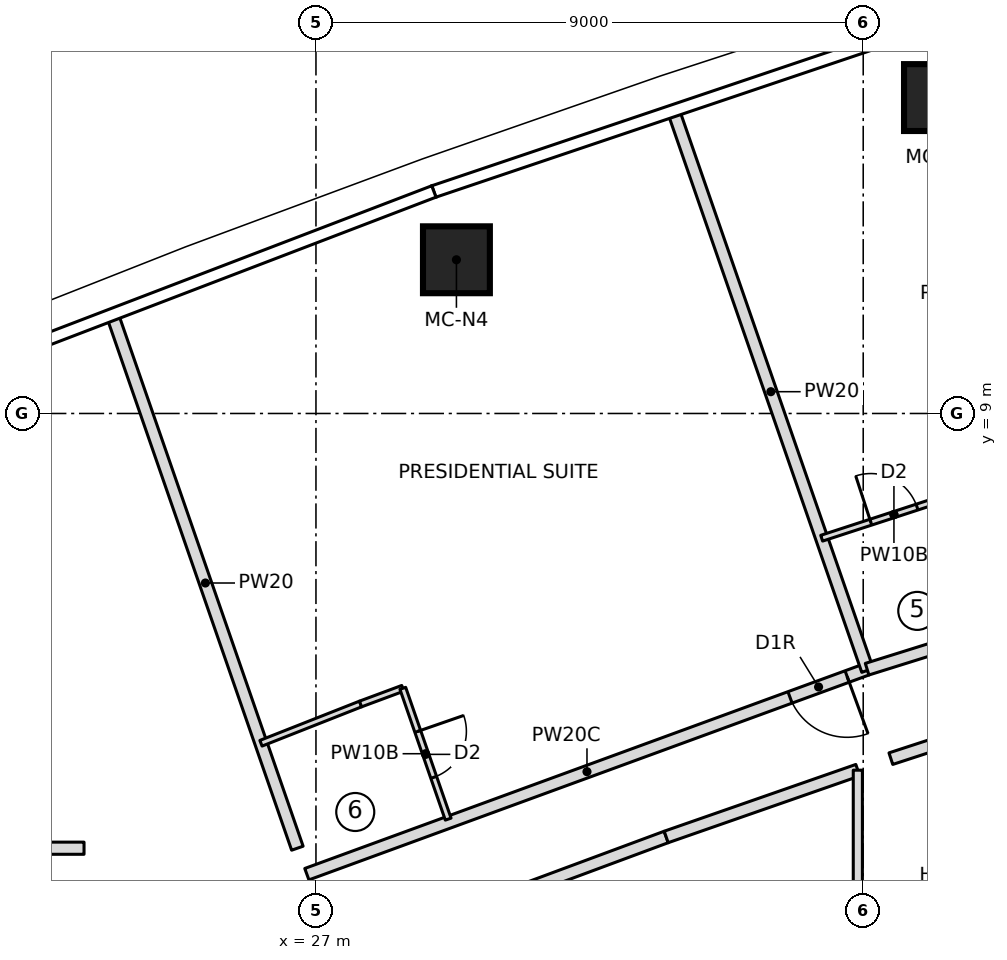
"""IFC4 building model, lengths in metres.
Left out: names, types, materials, properties, quantities, classifications, styles, units other than length and angle.
Written with IfcOpenShell. Run it as: python <this file> out.ifc"""

import sys

from ifc_helpers import new_model, si_unit, direction, frame, frame_2d, origin, origin_2d, place, context, subcontext, project, spatial, rectangle, extrude, element, fill, save


model = new_model("IFC4")
c1 = context("Model", 3, precision=1e-05, world=origin(), true_north=direction((0.0, 1.0)))
c2 = subcontext(c1, "Body", "Model", "MODEL_VIEW")
j1 = project(units=[si_unit("LENGTHUNIT", "METRE"), si_unit("PLANEANGLEUNIT", "RADIAN")], contexts=[c1])
p1 = place(None, origin())
s1 = spatial("IfcSite", under=j1, at=p1, CompositionType="ELEMENT")
p2 = place(p1, origin())
s2 = spatial("IfcBuilding", under=s1, at=p2, CompositionType="ELEMENT")
p3 = place(p2, frame((0.0, 0.0, 292.75)))
s3 = spatial("IfcBuildingStorey", under=s2, at=p3, CompositionType="ELEMENT", Elevation=292.75)
for number, where, z_axis, x_axis in (
    (1, (37.221, 14.196, 0.0), (0.0, 0.0, 1.0), (1.0, 0.0, 0.0)),
    (2, (29.31, 11.528, 0.0), (0.0, 0.0, 1.0), (1.0, 0.0, 0.0)),
):
    element("IfcColumn", number, at=place(p3, frame(where, z_axis=z_axis, x_axis=x_axis)), inside=s3, PredefinedType="COLUMN", context=c2, shape_type="SweptSolid", body=[
        extrude(rectangle(XDim=1.1, YDim=1.1, at=origin_2d()), origin(), (0.0, 0.0, 1.0), 3.55),
    ])
p4 = place(p3, frame((7.287, 1.85, 0.0), z_axis=(0.0, 0.0, 1.0), x_axis=(1.0, 0.0, 0.0)))
e3 = element("IfcWall", 3, at=p4, inside=s3, PredefinedType="PARTITIONING", context=c2, shape_type="SweptSolid", body=[
    extrude(rectangle(XDim=15.899, YDim=0.2, at=frame_2d((7.949, 0.0))), origin(), (0.0, 0.0, 1.0), 3.25),
])
p5 = place(p4, frame((7.624, 0.0, 0.0)))
e4 = element("IfcOpeningElement", 4, at=p5, cuts=e3, PredefinedType="OPENING", context=c2, shape_type="SweptSolid", body=[
    extrude(rectangle(XDim=1.0, YDim=2.1, at=frame_2d((0.5, 1.05))), frame((0.0, 0.11, 0.0), z_axis=(0.0, -1.0, 0.0), x_axis=(1.0, 0.0, 0.0)), (0.0, 0.0, 1.0), 0.22),
])
p6 = place(p3, frame((26.694, 1.85, 0.0), z_axis=(0.0, 0.0, 1.0), x_axis=(-0.327714422317, 0.944776829418, 0.0)))
e5 = element("IfcWall", 5, at=p6, inside=s3, PredefinedType="PARTITIONING", context=c2, shape_type="SweptSolid", body=[
    extrude(rectangle(XDim=9.233, YDim=0.2, at=frame_2d((4.617, 0.0))), origin(), (0.0, 0.0, 1.0), 3.25),
])
p7 = place(p3, frame((36.064, 4.794, 0.0), z_axis=(0.0, 0.0, 1.0), x_axis=(-0.93911227702, -0.34361043516, 0.0)))
e6 = element("IfcWall", 6, at=p7, inside=s3, PredefinedType="PARTITIONING", context=c2, shape_type="SweptSolid", body=[
    extrude(rectangle(XDim=9.812, YDim=0.2, at=frame_2d((4.906, 0.0))), origin(), (0.0, 0.0, 1.0), 3.25),
])
p8 = place(p7, frame((0.35, 0.0, 0.0)))
e7 = element("IfcOpeningElement", 7, at=p8, cuts=e6, PredefinedType="OPENING", context=c2, shape_type="SweptSolid", body=[
    extrude(rectangle(XDim=1.0, YDim=2.1, at=frame_2d((0.5, 1.05))), frame((0.0, 0.11, 0.0), z_axis=(0.0, -1.0, 0.0), x_axis=(1.0, 0.0, 0.0)), (0.0, 0.0, 1.0), 0.22),
])
p9 = place(p3, frame((26.096, 3.576, 0.0), z_axis=(0.0, 0.0, 1.0), x_axis=(0.930254925629, 0.366913850028, 0.0)))
e8 = element("IfcWall", 8, at=p9, inside=s3, PredefinedType="PARTITIONING", context=c2, shape_type="SweptSolid", body=[
    extrude(rectangle(XDim=1.76, YDim=0.1, at=frame_2d((0.88, 0.0))), origin(), (0.0, 0.0, 1.0), 3.25),
])
p10 = place(p3, frame((27.733, 4.222, 0.0), z_axis=(0.0, 0.0, 1.0), x_axis=(0.937514267289, 0.347946833049, 0.0)))
e9 = element("IfcWall", 9, at=p10, inside=s3, PredefinedType="PARTITIONING", context=c2, shape_type="SweptSolid", body=[
    extrude(rectangle(XDim=0.742, YDim=0.1, at=frame_2d((0.371, 0.0))), origin(), (0.0, 0.0, 1.0), 3.25),
])
p11 = place(p3, frame((28.428, 4.48, 0.0), z_axis=(0.0, 0.0, 1.0), x_axis=(0.327718024288, -0.944775579996, 0.0)))
e10 = element("IfcWall", 10, at=p11, inside=s3, PredefinedType="PARTITIONING", context=c2, shape_type="SweptSolid", body=[
    extrude(rectangle(XDim=2.277, YDim=0.1, at=frame_2d((1.139, 0.0))), origin(), (0.0, 0.0, 1.0), 3.25),
])
p12 = place(p11, frame((0.75, 0.0, 0.0)))
e11 = element("IfcOpeningElement", 11, at=p12, cuts=e10, PredefinedType="OPENING", context=c2, shape_type="SweptSolid", body=[
    extrude(rectangle(XDim=0.8, YDim=2.1, at=frame_2d((0.4, 1.05))), frame((0.0, 0.06, 0.0), z_axis=(0.0, -1.0, 0.0), x_axis=(1.0, 0.0, 0.0)), (0.0, 0.0, 1.0), 0.12),
])
p13 = place(p3, frame((36.071, 4.775, 0.0), z_axis=(0.0, 0.0, 1.0), x_axis=(-0.327725028322, 0.94477315045, 0.0)))
e12 = element("IfcWall", 12, at=p13, inside=s3, PredefinedType="PARTITIONING", context=c2, shape_type="SweptSolid", body=[
    extrude(rectangle(XDim=9.702, YDim=0.2, at=frame_2d((4.851, 0.0))), origin(), (0.0, 0.0, 1.0), 3.25),
])
p14 = place(p3, frame((44.031, 7.286, 0.0), z_axis=(0.0, 0.0, 1.0), x_axis=(-0.95441177989, -0.29849313963, 0.0)))
e13 = element("IfcWall", 13, at=p14, inside=s3, PredefinedType="PARTITIONING", context=c2, shape_type="SweptSolid", body=[
    extrude(rectangle(XDim=8.348, YDim=0.2, at=frame_2d((4.174, 0.0))), origin(), (0.0, 0.0, 1.0), 3.25),
])
p15 = place(p14, frame((0.35, 0.0, 0.0)))
e14 = element("IfcOpeningElement", 14, at=p15, cuts=e13, PredefinedType="OPENING", context=c2, shape_type="SweptSolid", body=[
    extrude(rectangle(XDim=1.0, YDim=2.1, at=frame_2d((0.5, 1.05))), frame((0.0, 0.11, 0.0), z_axis=(0.0, -1.0, 0.0), x_axis=(1.0, 0.0, 0.0)), (0.0, 0.0, 1.0), 0.22),
])
p16 = place(p3, frame((35.317, 6.948, 0.0), z_axis=(0.0, 0.0, 1.0), x_axis=(0.950666002187, 0.310216299194, 0.0)))
e15 = element("IfcWall", 15, at=p16, inside=s3, PredefinedType="PARTITIONING", context=c2, shape_type="SweptSolid", body=[
    extrude(rectangle(XDim=2.5, YDim=0.1, at=frame_2d((1.25, 0.0))), origin(), (0.0, 0.0, 1.0), 3.25),
])
p17 = place(p16, frame((0.85, 0.0, 0.0)))
e16 = element("IfcOpeningElement", 16, at=p17, cuts=e15, PredefinedType="OPENING", context=c2, shape_type="SweptSolid", body=[
    extrude(rectangle(XDim=0.8, YDim=2.1, at=frame_2d((0.4, 1.05))), frame((0.0, 0.06, 0.0), z_axis=(0.0, -1.0, 0.0), x_axis=(1.0, 0.0, 0.0)), (0.0, 0.0, 1.0), 0.12),
])
p18 = place(p3, frame((29.092, 0.673, 0.0), z_axis=(0.0, 0.0, 1.0), x_axis=(0.937460178932, 0.348092534992, 0.0)))
e17 = element("IfcWall", 17, at=p18, inside=s3, PredefinedType="PARTITIONING", context=c2, shape_type="SweptSolid", body=[
    extrude(rectangle(XDim=3.913, YDim=0.2, at=frame_2d((1.957, 0.0))), origin(), (0.0, 0.0, 1.0), 3.25),
])
p19 = place(p3, frame((32.76, 2.035, 0.0), z_axis=(0.0, 0.0, 1.0), x_axis=(0.944294313876, 0.329102185927, 0.0)))
e18 = element("IfcWall", 18, at=p19, inside=s3, PredefinedType="PARTITIONING", context=c2, shape_type="SweptSolid", body=[
    extrude(rectangle(XDim=3.338, YDim=0.2, at=frame_2d((1.669, 0.0))), origin(), (0.0, 0.0, 1.0), 3.25),
])
p20 = place(p3, frame((35.911, -3.133, 0.0), z_axis=(0.0, 0.0, 1.0), x_axis=(0.0, 1.0, 0.0)))
e19 = element("IfcWall", 19, at=p20, inside=s3, PredefinedType="PARTITIONING", context=c2, shape_type="SweptSolid", body=[
    extrude(rectangle(XDim=6.267, YDim=0.15, at=frame_2d((3.133, 0.0))), origin(), (0.0, 0.0, 1.0), 3.25),
])
p21 = place(p3, frame((36.455, 3.323, 0.0), z_axis=(0.0, 0.0, 1.0), x_axis=(0.950716244522, 0.310062287938, 0.0)))
e20 = element("IfcWall", 20, at=p21, inside=s3, PredefinedType="PARTITIONING", context=c2, shape_type="SweptSolid", body=[
    extrude(rectangle(XDim=3.913, YDim=0.2, at=frame_2d((1.956, 0.0))), origin(), (0.0, 0.0, 1.0), 3.25),
])
p22 = place(p12, origin())
e21 = element("IfcDoor", 21, at=p22, inside=s3, OperationType="SINGLE_SWING_LEFT", PredefinedType="DOOR", context=c2, shape_type="SweptSolid", body=[
    extrude(rectangle(XDim=0.8, YDim=2.1, at=frame_2d((0.4, 1.05))), frame((0.0, 0.025, 0.0), z_axis=(0.0, -1.0, 0.0), x_axis=(1.0, 0.0, 0.0)), (0.0, 0.0, 1.0), 0.05),
])
fill(e11, e21)
p23 = place(p8, origin())
e22 = element("IfcDoor", 22, at=p23, inside=s3, OperationType="SINGLE_SWING_RIGHT", PredefinedType="DOOR", context=c2, shape_type="SweptSolid", body=[
    extrude(rectangle(XDim=1.0, YDim=2.1, at=frame_2d((0.5, 1.05))), frame((0.0, 0.025, 0.0), z_axis=(0.0, -1.0, 0.0), x_axis=(1.0, 0.0, 0.0)), (0.0, 0.0, 1.0), 0.05),
])
fill(e7, e22)
p24 = place(p17, origin())
e23 = element("IfcDoor", 23, at=p24, inside=s3, OperationType="SINGLE_SWING_LEFT", PredefinedType="DOOR", context=c2, shape_type="SweptSolid", body=[
    extrude(rectangle(XDim=0.8, YDim=2.1, at=frame_2d((0.4, 1.05))), frame((0.0, 0.025, 0.0), z_axis=(0.0, -1.0, 0.0), x_axis=(1.0, 0.0, 0.0)), (0.0, 0.0, 1.0), 0.05),
])
fill(e16, e23)
save(model, sys.argv[1])
